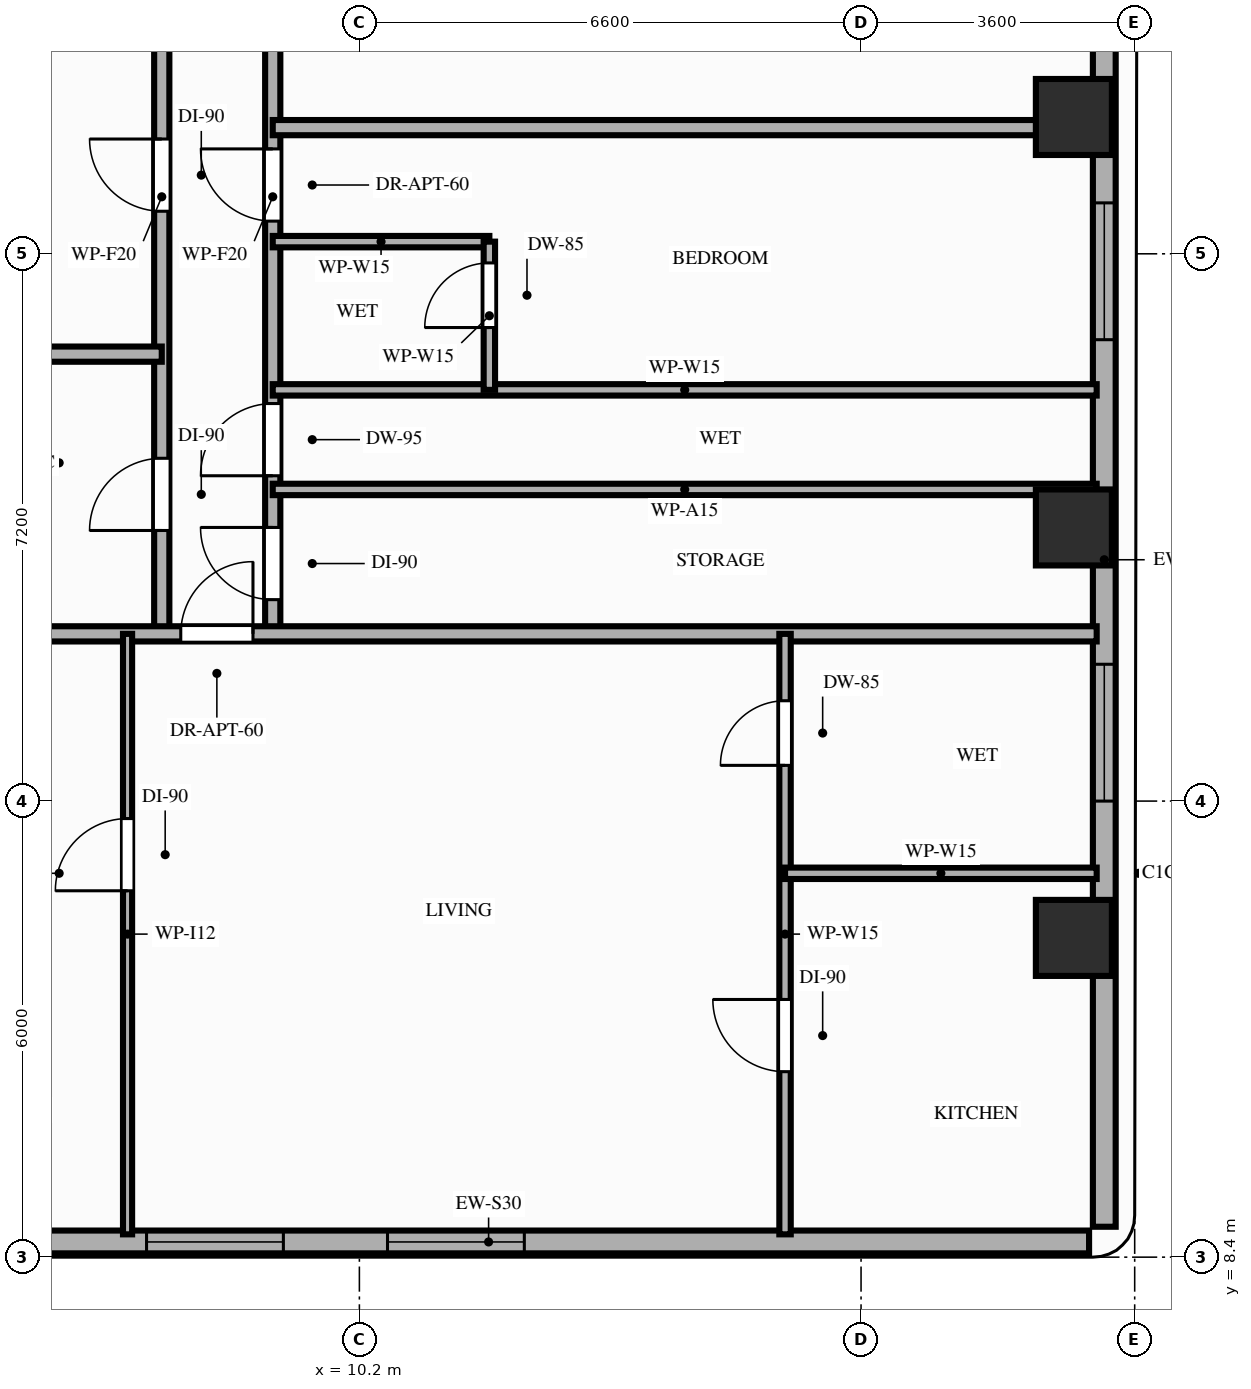
"""IFC4 building model, lengths in metres.
Left out: names, types, materials, properties, quantities, classifications, styles, units other than length and angle.
Written with IfcOpenShell. Run it as: python <this file> out.ifc"""

import sys

from ifc_helpers import new_model, si_unit, direction, frame, frame_2d, origin, origin_2d, place, context, subcontext, project, spatial, rectangle, extrude, element, fill, save


model = new_model("IFC4")
c1 = context("Model", 3, precision=1e-05, world=origin(), true_north=direction((0.0, 1.0)))
c2 = subcontext(c1, "Body", "Model", "MODEL_VIEW")
j1 = project(units=[si_unit("LENGTHUNIT", "METRE"), si_unit("PLANEANGLEUNIT", "RADIAN")], contexts=[c1])
p1 = place(None, origin())
s1 = spatial("IfcSite", under=j1, at=p1, CompositionType="ELEMENT")
p2 = place(p1, origin())
s2 = spatial("IfcBuilding", under=s1, at=p2, CompositionType="ELEMENT")
p3 = place(p2, frame((0.0, 0.0, 152.2)))
s3 = spatial("IfcBuildingStorey", under=s2, at=p3, CompositionType="ELEMENT", Elevation=152.2)
for number, where, z_axis, x_axis in (
    (1, (19.6, 12.6, 0.0), (0.0, 0.0, 1.0), (1.0, 0.0, 0.0)),
    (2, (19.6, 18.0, 0.0), (0.0, 0.0, 1.0), (1.0, 0.0, 0.0)),
    (3, (19.6, 23.4, 0.0), (0.0, 0.0, 1.0), (1.0, 0.0, 0.0)),
):
    element("IfcColumn", number, at=place(p3, frame(where, z_axis=z_axis, x_axis=x_axis)), inside=s3, PredefinedType="COLUMN", context=c2, shape_type="SweptSolid", body=[
        extrude(rectangle(XDim=1.0, YDim=1.0, at=origin_2d()), origin(), (0.0, 0.0, 1.0), 3.8),
    ])
p4 = place(p3, frame((4.0, 8.6, 0.0), z_axis=(0.0, 0.0, 1.0), x_axis=(1.0, 0.0, 0.0)))
e4 = element("IfcWall", 4, at=p4, inside=s3, PredefinedType="STANDARD", context=c2, shape_type="SweptSolid", body=[
    extrude(rectangle(XDim=15.8, YDim=0.3, at=frame_2d((7.9, 0.0))), origin(), (0.0, 0.0, 1.0), 3.56),
])
p5 = place(p4, frame((6.57, 0.0, 0.85)))
e5 = element("IfcOpeningElement", 5, at=p5, cuts=e4, PredefinedType="OPENING", context=c2, shape_type="SweptSolid", body=[
    extrude(rectangle(XDim=1.8, YDim=1.75, at=frame_2d((0.9, 0.875))), frame((0.0, 0.16, 0.0), z_axis=(0.0, -1.0, 0.0), x_axis=(1.0, 0.0, 0.0)), (0.0, 0.0, 1.0), 0.32),
])
p6 = place(p4, frame((3.4, 0.0, 0.85)))
e6 = element("IfcOpeningElement", 6, at=p6, cuts=e4, PredefinedType="OPENING", context=c2, shape_type="SweptSolid", body=[
    extrude(rectangle(XDim=1.8, YDim=1.75, at=frame_2d((0.9, 0.875))), frame((0.0, 0.16, 0.0), z_axis=(0.0, -1.0, 0.0), x_axis=(1.0, 0.0, 0.0)), (0.0, 0.0, 1.0), 0.32),
])
p7 = place(p3, frame((20.0, 8.8, 0.0), z_axis=(0.0, 0.0, 1.0), x_axis=(0.0, 1.0, 0.0)))
e7 = element("IfcWall", 7, at=p7, inside=s3, PredefinedType="STANDARD", context=c2, shape_type="SweptSolid", body=[
    extrude(rectangle(XDim=17.55, YDim=0.3, at=frame_2d((8.775, 0.0))), origin(), (0.0, 0.0, 1.0), 2.99),
])
p8 = place(p7, frame((11.67, 0.0, 0.85)))
e8 = element("IfcOpeningElement", 8, at=p8, cuts=e7, PredefinedType="OPENING", context=c2, shape_type="SweptSolid", body=[
    extrude(rectangle(XDim=1.8, YDim=1.75, at=frame_2d((0.9, 0.875))), frame((0.0, 0.16, 0.0), z_axis=(0.0, -1.0, 0.0), x_axis=(1.0, 0.0, 0.0)), (0.0, 0.0, 1.0), 0.32),
])
p9 = place(p7, frame((5.6, 0.0, 0.85)))
e9 = element("IfcOpeningElement", 9, at=p9, cuts=e7, PredefinedType="OPENING", context=c2, shape_type="SweptSolid", body=[
    extrude(rectangle(XDim=1.8, YDim=1.75, at=frame_2d((0.9, 0.875))), frame((0.0, 0.16, 0.0), z_axis=(0.0, -1.0, 0.0), x_axis=(1.0, 0.0, 0.0)), (0.0, 0.0, 1.0), 0.32),
])
p10 = place(p3, frame((7.6, 16.6, 0.0), z_axis=(0.0, 0.0, 1.0), x_axis=(0.0, 1.0, 0.0)))
e10 = element("IfcWall", 10, at=p10, inside=s3, PredefinedType="PARTITIONING", context=c2, shape_type="SweptSolid", body=[
    extrude(rectangle(XDim=11.5, YDim=0.2, at=frame_2d((5.75, 0.0))), origin(), (0.0, 0.0, 1.0), 2.99),
])
p11 = place(p10, frame((1.36, 0.0, 0.0)))
e11 = element("IfcOpeningElement", 11, at=p11, cuts=e10, PredefinedType="OPENING", context=c2, shape_type="SweptSolid", body=[
    extrude(rectangle(XDim=0.95, YDim=2.15, at=frame_2d((0.475, 1.075))), frame((0.0, 0.11, 0.0), z_axis=(0.0, -1.0, 0.0), x_axis=(1.0, 0.0, 0.0)), (0.0, 0.0, 1.0), 0.22),
])
p12 = place(p10, frame((5.56, 0.0, 0.0)))
e12 = element("IfcOpeningElement", 12, at=p12, cuts=e10, PredefinedType="OPENING", context=c2, shape_type="SweptSolid", body=[
    extrude(rectangle(XDim=0.95, YDim=2.15, at=frame_2d((0.475, 1.075))), frame((0.0, 0.11, 0.0), z_axis=(0.0, -1.0, 0.0), x_axis=(1.0, 0.0, 0.0)), (0.0, 0.0, 1.0), 0.22),
])
p13 = place(p10, frame((9.47, 0.0, 0.0)))
e13 = element("IfcOpeningElement", 13, at=p13, cuts=e10, PredefinedType="OPENING", context=c2, shape_type="SweptSolid", body=[
    extrude(rectangle(XDim=0.95, YDim=2.15, at=frame_2d((0.475, 1.075))), frame((0.0, 0.11, 0.0), z_axis=(0.0, -1.0, 0.0), x_axis=(1.0, 0.0, 0.0)), (0.0, 0.0, 1.0), 0.22),
])
p14 = place(p3, frame((9.06, 16.6, 0.0), z_axis=(0.0, 0.0, 1.0), x_axis=(0.0, 1.0, 0.0)))
e14 = element("IfcWall", 14, at=p14, inside=s3, PredefinedType="PARTITIONING", context=c2, shape_type="SweptSolid", body=[
    extrude(rectangle(XDim=11.5, YDim=0.2, at=frame_2d((5.75, 0.0))), origin(), (0.0, 0.0, 1.0), 2.99),
])
p15 = place(p14, frame((0.45, 0.0, 0.0)))
e15 = element("IfcOpeningElement", 15, at=p15, cuts=e14, PredefinedType="OPENING", context=c2, shape_type="SweptSolid", body=[
    extrude(rectangle(XDim=0.95, YDim=2.15, at=frame_2d((0.475, 1.075))), frame((0.0, 0.11, 0.0), z_axis=(0.0, -1.0, 0.0), x_axis=(1.0, 0.0, 0.0)), (0.0, 0.0, 1.0), 0.22),
])
p16 = place(p14, frame((2.08, 0.0, 0.0)))
e16 = element("IfcOpeningElement", 16, at=p16, cuts=e14, PredefinedType="OPENING", context=c2, shape_type="SweptSolid", body=[
    extrude(rectangle(XDim=0.95, YDim=2.1, at=frame_2d((0.475, 1.05))), frame((0.0, 0.11, 0.0), z_axis=(0.0, -1.0, 0.0), x_axis=(1.0, 0.0, 0.0)), (0.0, 0.0, 1.0), 0.22),
])
p17 = place(p14, frame((8.6, 0.0, 0.0)))
e17 = element("IfcOpeningElement", 17, at=p17, cuts=e14, PredefinedType="OPENING", context=c2, shape_type="SweptSolid", body=[
    extrude(rectangle(XDim=0.95, YDim=2.15, at=frame_2d((0.475, 1.075))), frame((0.0, 0.11, 0.0), z_axis=(0.0, -1.0, 0.0), x_axis=(1.0, 0.0, 0.0)), (0.0, 0.0, 1.0), 0.22),
])
p18 = place(p14, frame((5.43, 0.0, 0.0)))
e18 = element("IfcOpeningElement", 18, at=p18, cuts=e14, PredefinedType="OPENING", context=c2, shape_type="SweptSolid", body=[
    extrude(rectangle(XDim=0.95, YDim=2.15, at=frame_2d((0.475, 1.075))), frame((0.0, 0.11, 0.0), z_axis=(0.0, -1.0, 0.0), x_axis=(1.0, 0.0, 0.0)), (0.0, 0.0, 1.0), 0.22),
])
p19 = place(p3, frame((3.9, 16.6, 0.0), z_axis=(0.0, 0.0, 1.0), x_axis=(1.0, 0.0, 0.0)))
e19 = element("IfcWall", 19, at=p19, inside=s3, PredefinedType="PARTITIONING", context=c2, shape_type="SweptSolid", body=[
    extrude(rectangle(XDim=16.0, YDim=0.2, at=frame_2d((8.0, 0.0))), origin(), (0.0, 0.0, 1.0), 2.99),
])
p20 = place(p19, frame((3.95, 0.0, 0.0)))
e20 = element("IfcOpeningElement", 20, at=p20, cuts=e19, PredefinedType="OPENING", context=c2, shape_type="SweptSolid", body=[
    extrude(rectangle(XDim=0.95, YDim=2.15, at=frame_2d((0.475, 1.075))), frame((0.0, 0.11, 0.0), z_axis=(0.0, -1.0, 0.0), x_axis=(1.0, 0.0, 0.0)), (0.0, 0.0, 1.0), 0.22),
])
p21 = place(p3, frame((3.9, 20.28, 0.0), z_axis=(0.0, 0.0, 1.0), x_axis=(1.0, 0.0, 0.0)))
e21 = element("IfcWall", 21, at=p21, inside=s3, PredefinedType="PARTITIONING", context=c2, shape_type="SweptSolid", body=[
    extrude(rectangle(XDim=3.7, YDim=0.2, at=frame_2d((1.85, 0.0))), origin(), (0.0, 0.0, 1.0), 2.99),
])
p22 = place(p3, frame((7.15, 8.7, 0.0), z_axis=(0.0, 0.0, 1.0), x_axis=(0.0, 1.0, 0.0)))
e22 = element("IfcWall", 22, at=p22, inside=s3, PredefinedType="PARTITIONING", context=c2, shape_type="SweptSolid", body=[
    extrude(rectangle(XDim=7.9, YDim=0.12, at=frame_2d((3.95, 0.0))), origin(), (0.0, 0.0, 1.0), 2.99),
])
p23 = place(p22, frame((4.52, 0.0, 0.0)))
e23 = element("IfcOpeningElement", 23, at=p23, cuts=e22, PredefinedType="OPENING", context=c2, shape_type="SweptSolid", body=[
    extrude(rectangle(XDim=0.95, YDim=2.15, at=frame_2d((0.475, 1.075))), frame((0.0, 0.07, 0.0), z_axis=(0.0, -1.0, 0.0), x_axis=(1.0, 0.0, 0.0)), (0.0, 0.0, 1.0), 0.14),
])
p24 = place(p3, frame((15.8, 8.7, 0.0), z_axis=(0.0, 0.0, 1.0), x_axis=(0.0, 1.0, 0.0)))
e24 = element("IfcWall", 24, at=p24, inside=s3, PredefinedType="PARTITIONING", context=c2, shape_type="SweptSolid", body=[
    extrude(rectangle(XDim=7.9, YDim=0.15, at=frame_2d((3.95, 0.0))), origin(), (0.0, 0.0, 1.0), 2.99),
])
p25 = place(p24, frame((2.14, 0.0, 0.0)))
e25 = element("IfcOpeningElement", 25, at=p25, cuts=e24, PredefinedType="OPENING", context=c2, shape_type="SweptSolid", body=[
    extrude(rectangle(XDim=0.95, YDim=2.15, at=frame_2d((0.475, 1.075))), frame((0.0, 0.085, 0.0), z_axis=(0.0, -1.0, 0.0), x_axis=(1.0, 0.0, 0.0)), (0.0, 0.0, 1.0), 0.17),
])
p26 = place(p24, frame((6.17, 0.0, 0.0)))
e26 = element("IfcOpeningElement", 26, at=p26, cuts=e24, PredefinedType="OPENING", context=c2, shape_type="SweptSolid", body=[
    extrude(rectangle(XDim=0.85, YDim=2.1, at=frame_2d((0.425, 1.05))), frame((0.0, 0.085, 0.0), z_axis=(0.0, -1.0, 0.0), x_axis=(1.0, 0.0, 0.0)), (0.0, 0.0, 1.0), 0.17),
])
p27 = place(p3, frame((15.8, 13.45, 0.0), z_axis=(0.0, 0.0, 1.0), x_axis=(1.0, 0.0, 0.0)))
e27 = element("IfcWall", 27, at=p27, inside=s3, PredefinedType="PARTITIONING", context=c2, shape_type="SweptSolid", body=[
    extrude(rectangle(XDim=4.1, YDim=0.15, at=frame_2d((2.05, 0.0))), origin(), (0.0, 0.0, 1.0), 2.99),
])
for number, where, z_axis, x_axis in (
    (28, (9.06, 18.5, 0.0), (0.0, 0.0, 1.0), (1.0, 0.0, 0.0)),
    (29, (9.06, 19.81, 0.0), (0.0, 0.0, 1.0), (1.0, 0.0, 0.0)),
):
    element("IfcWall", number, at=place(p3, frame(where, z_axis=z_axis, x_axis=x_axis)), inside=s3, PredefinedType="PARTITIONING", context=c2, shape_type="SweptSolid", body=[
        extrude(rectangle(XDim=10.84, YDim=0.15, at=frame_2d((5.42, 0.0))), origin(), (0.0, 0.0, 1.0), 2.99),
    ])
p28 = place(p3, frame((9.06, 23.26, 0.0), z_axis=(0.0, 0.0, 1.0), x_axis=(1.0, 0.0, 0.0)))
e30 = element("IfcWall", 30, at=p28, inside=s3, PredefinedType="PARTITIONING", context=c2, shape_type="SweptSolid", body=[
    extrude(rectangle(XDim=10.84, YDim=0.2, at=frame_2d((5.42, 0.0))), origin(), (0.0, 0.0, 1.0), 2.99),
])
p29 = place(p3, frame((9.06, 21.76, 0.0), z_axis=(0.0, 0.0, 1.0), x_axis=(1.0, 0.0, 0.0)))
e31 = element("IfcWall", 31, at=p29, inside=s3, PredefinedType="PARTITIONING", context=c2, shape_type="SweptSolid", body=[
    extrude(rectangle(XDim=2.85, YDim=0.15, at=frame_2d((1.425, 0.0))), origin(), (0.0, 0.0, 1.0), 3.15),
])
p30 = place(p3, frame((11.91, 19.81, 0.0), z_axis=(0.0, 0.0, 1.0), x_axis=(0.0, 1.0, 0.0)))
e32 = element("IfcWall", 32, at=p30, inside=s3, PredefinedType="PARTITIONING", context=c2, shape_type="SweptSolid", body=[
    extrude(rectangle(XDim=1.95, YDim=0.15, at=frame_2d((0.975, 0.0))), origin(), (0.0, 0.0, 1.0), 3.15),
])
p31 = place(p30, frame((0.82, 0.0, 0.0)))
e33 = element("IfcOpeningElement", 33, at=p31, cuts=e32, PredefinedType="OPENING", context=c2, shape_type="SweptSolid", body=[
    extrude(rectangle(XDim=0.85, YDim=2.1, at=frame_2d((0.425, 1.05))), frame((0.0, 0.085, 0.0), z_axis=(0.0, -1.0, 0.0), x_axis=(1.0, 0.0, 0.0)), (0.0, 0.0, 1.0), 0.17),
])
p32 = place(p5, origin())
e34 = element("IfcWindow", 34, at=p32, inside=s3, PartitioningType="SINGLE_PANEL", PredefinedType="WINDOW", context=c2, shape_type="SweptSolid", body=[
    extrude(rectangle(XDim=1.8, YDim=1.75, at=frame_2d((0.9, 0.875))), frame((0.0, 0.03, 0.0), z_axis=(0.0, -1.0, 0.0), x_axis=(1.0, 0.0, 0.0)), (0.0, 0.0, 1.0), 0.06),
])
fill(e5, e34)
p33 = place(p8, origin())
e35 = element("IfcWindow", 35, at=p33, inside=s3, PartitioningType="SINGLE_PANEL", PredefinedType="WINDOW", context=c2, shape_type="SweptSolid", body=[
    extrude(rectangle(XDim=1.8, YDim=1.75, at=frame_2d((0.9, 0.875))), frame((0.0, 0.03, 0.0), z_axis=(0.0, -1.0, 0.0), x_axis=(1.0, 0.0, 0.0)), (0.0, 0.0, 1.0), 0.06),
])
fill(e8, e35)
p34 = place(p9, origin())
e36 = element("IfcWindow", 36, at=p34, inside=s3, PartitioningType="SINGLE_PANEL", PredefinedType="WINDOW", context=c2, shape_type="SweptSolid", body=[
    extrude(rectangle(XDim=1.8, YDim=1.75, at=frame_2d((0.9, 0.875))), frame((0.0, 0.03, 0.0), z_axis=(0.0, -1.0, 0.0), x_axis=(1.0, 0.0, 0.0)), (0.0, 0.0, 1.0), 0.06),
])
fill(e9, e36)
p35 = place(p6, origin())
e37 = element("IfcWindow", 37, at=p35, inside=s3, PartitioningType="SINGLE_PANEL", PredefinedType="WINDOW", context=c2, shape_type="SweptSolid", body=[
    extrude(rectangle(XDim=1.8, YDim=1.75, at=frame_2d((0.9, 0.875))), frame((0.0, 0.03, 0.0), z_axis=(0.0, -1.0, 0.0), x_axis=(1.0, 0.0, 0.0)), (0.0, 0.0, 1.0), 0.06),
])
fill(e6, e37)
p36 = place(p11, origin())
e38 = element("IfcDoor", 38, at=p36, inside=s3, OperationType="SINGLE_SWING_LEFT", PredefinedType="DOOR", context=c2, shape_type="SweptSolid", body=[
    extrude(rectangle(XDim=0.95, YDim=2.15, at=frame_2d((0.475, 1.075))), frame((0.0, 0.025, 0.0), z_axis=(0.0, -1.0, 0.0), x_axis=(1.0, 0.0, 0.0)), (0.0, 0.0, 1.0), 0.05),
])
fill(e11, e38)
p37 = place(p12, origin())
e39 = element("IfcDoor", 39, at=p37, inside=s3, OperationType="SINGLE_SWING_RIGHT", PredefinedType="DOOR", context=c2, shape_type="SweptSolid", body=[
    extrude(rectangle(XDim=0.95, YDim=2.15, at=frame_2d((0.475, 1.075))), frame((0.0, 0.025, 0.0), z_axis=(0.0, -1.0, 0.0), x_axis=(1.0, 0.0, 0.0)), (0.0, 0.0, 1.0), 0.05),
])
fill(e12, e39)
p38 = place(p20, origin())
e40 = element("IfcDoor", 40, at=p38, inside=s3, OperationType="SINGLE_SWING_RIGHT", PredefinedType="DOOR", context=c2, shape_type="SweptSolid", body=[
    extrude(rectangle(XDim=0.95, YDim=2.15, at=frame_2d((0.475, 1.075))), frame((0.0, 0.025, 0.0), z_axis=(0.0, -1.0, 0.0), x_axis=(1.0, 0.0, 0.0)), (0.0, 0.0, 1.0), 0.05),
])
fill(e20, e40)
p39 = place(p23, origin())
e41 = element("IfcDoor", 41, at=p39, inside=s3, OperationType="SINGLE_SWING_LEFT", PredefinedType="DOOR", context=c2, shape_type="SweptSolid", body=[
    extrude(rectangle(XDim=0.95, YDim=2.15, at=frame_2d((0.475, 1.075))), frame((0.0, 0.025, 0.0), z_axis=(0.0, -1.0, 0.0), x_axis=(1.0, 0.0, 0.0)), (0.0, 0.0, 1.0), 0.05),
])
fill(e23, e41)
p40 = place(p25, origin())
e42 = element("IfcDoor", 42, at=p40, inside=s3, OperationType="SINGLE_SWING_RIGHT", PredefinedType="DOOR", context=c2, shape_type="SweptSolid", body=[
    extrude(rectangle(XDim=0.95, YDim=2.15, at=frame_2d((0.475, 1.075))), frame((0.0, 0.025, 0.0), z_axis=(0.0, -1.0, 0.0), x_axis=(1.0, 0.0, 0.0)), (0.0, 0.0, 1.0), 0.05),
])
fill(e25, e42)
p41 = place(p26, origin())
e43 = element("IfcDoor", 43, at=p41, inside=s3, OperationType="SINGLE_SWING_LEFT", PredefinedType="DOOR", context=c2, shape_type="SweptSolid", body=[
    extrude(rectangle(XDim=0.85, YDim=2.1, at=frame_2d((0.425, 1.05))), frame((0.0, 0.025, 0.0), z_axis=(0.0, -1.0, 0.0), x_axis=(1.0, 0.0, 0.0)), (0.0, 0.0, 1.0), 0.05),
])
fill(e26, e43)
p42 = place(p15, origin())
e44 = element("IfcDoor", 44, at=p42, inside=s3, OperationType="SINGLE_SWING_RIGHT", PredefinedType="DOOR", context=c2, shape_type="SweptSolid", body=[
    extrude(rectangle(XDim=0.95, YDim=2.15, at=frame_2d((0.475, 1.075))), frame((0.0, 0.025, 0.0), z_axis=(0.0, -1.0, 0.0), x_axis=(1.0, 0.0, 0.0)), (0.0, 0.0, 1.0), 0.05),
])
fill(e15, e44)
p43 = place(p16, origin())
e45 = element("IfcDoor", 45, at=p43, inside=s3, OperationType="SINGLE_SWING_LEFT", PredefinedType="DOOR", context=c2, shape_type="SweptSolid", body=[
    extrude(rectangle(XDim=0.95, YDim=2.1, at=frame_2d((0.475, 1.05))), frame((0.0, 0.025, 0.0), z_axis=(0.0, -1.0, 0.0), x_axis=(1.0, 0.0, 0.0)), (0.0, 0.0, 1.0), 0.05),
])
fill(e16, e45)
p44 = place(p31, origin())
e46 = element("IfcDoor", 46, at=p44, inside=s3, OperationType="SINGLE_SWING_LEFT", PredefinedType="DOOR", context=c2, shape_type="SweptSolid", body=[
    extrude(rectangle(XDim=0.85, YDim=2.1, at=frame_2d((0.425, 1.05))), frame((0.0, 0.025, 0.0), z_axis=(0.0, -1.0, 0.0), x_axis=(1.0, 0.0, 0.0)), (0.0, 0.0, 1.0), 0.05),
])
fill(e33, e46)
p45 = place(p18, origin())
e47 = element("IfcDoor", 47, at=p45, inside=s3, OperationType="SINGLE_SWING_RIGHT", PredefinedType="DOOR", context=c2, shape_type="SweptSolid", body=[
    extrude(rectangle(XDim=0.95, YDim=2.15, at=frame_2d((0.475, 1.075))), frame((0.0, 0.025, 0.0), z_axis=(0.0, -1.0, 0.0), x_axis=(1.0, 0.0, 0.0)), (0.0, 0.0, 1.0), 0.05),
])
fill(e18, e47)
save(model, sys.argv[1])
